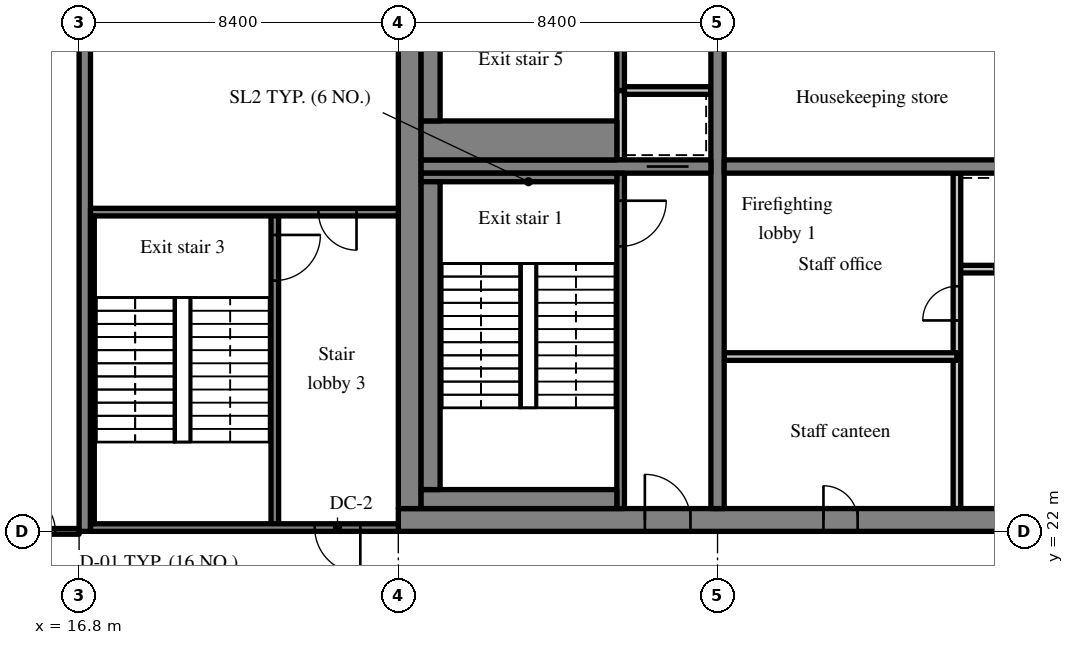
"""IFC4 building model, lengths in metres.
Left out: names, types, materials, properties, quantities, classifications, styles, units other than length and angle.
Written with IfcOpenShell. Run it as: python <this file> out.ifc"""

import sys

from ifc_helpers import new_model, si_unit, direction, frame, frame_2d, origin, place, context, subcontext, project, spatial, rectangle, extrude, source, transform, mapped, element, fill, save


model = new_model("IFC4")
c1 = context("Model", 3, precision=1e-05, world=origin(), true_north=direction((0.0, 1.0)))
c2 = subcontext(c1, "Body", "Model", "MODEL_VIEW")
j1 = project(units=[si_unit("LENGTHUNIT", "METRE"), si_unit("PLANEANGLEUNIT", "RADIAN")], contexts=[c1])
p1 = place(None, origin())
s1 = spatial("IfcSite", under=j1, at=p1, CompositionType="ELEMENT")
p2 = place(p1, origin())
s2 = spatial("IfcBuilding", under=s1, at=p2, CompositionType="ELEMENT")
p3 = place(p2, frame((0.0, 0.0, 225.7)))
s3 = spatial("IfcBuildingStorey", under=s2, at=p3, CompositionType="ELEMENT", Elevation=225.7)
m1 = source(origin(), c2, "Body", "SweptSolid", [
    extrude(rectangle(XDim=50.4, YDim=0.6, at=frame_2d((25.2, 0.0))), origin(), (0.0, 0.0, 1.0), 3.62),
])
p4 = place(p3, frame((25.2, 22.3, 0.0), z_axis=(0.0, 0.0, 1.0), x_axis=(1.0, 0.0, 0.0)))
e1 = element("IfcWall", 1, at=p4, inside=s3, PredefinedType="SHEAR", context=c2, shape_type="MappedRepresentation", body=[
    mapped(m1, transform((0.0, 0.0, 0.0), scale=1.0)),
])
m2 = source(origin(), c2, "Body", "SweptSolid", [
    extrude(rectangle(XDim=1.8, YDim=2.1, at=frame_2d((0.9, 1.05))), frame((0.0, 0.31, 0.0), z_axis=(0.0, -1.0, 0.0), x_axis=(1.0, 0.0, 0.0)), (0.0, 0.0, 1.0), 0.62),
])
p5 = place(p4, frame((15.9, 0.0, 0.0)))
e2 = element("IfcOpeningElement", 2, at=p5, cuts=e1, PredefinedType="OPENING", context=c2, shape_type="MappedRepresentation", body=[
    mapped(m2, transform((0.0, 0.0, 0.0), scale=1.0)),
])
m3 = source(origin(), c2, "Body", "SweptSolid", [
    extrude(rectangle(XDim=0.9, YDim=2.1, at=frame_2d((0.45, 1.05))), frame((0.0, 0.31, 0.0), z_axis=(0.0, -1.0, 0.0), x_axis=(1.0, 0.0, 0.0)), (0.0, 0.0, 1.0), 0.62),
])
p6 = place(p4, frame((11.187, 0.0, 0.0)))
e3 = element("IfcOpeningElement", 3, at=p6, cuts=e1, PredefinedType="OPENING", context=c2, shape_type="MappedRepresentation", body=[
    mapped(m3, transform((0.0, 0.0, 0.0), scale=1.0)),
])
p7 = place(p4, frame((21.513, 0.0, 0.0)))
e4 = element("IfcOpeningElement", 4, at=p7, cuts=e1, PredefinedType="OPENING", context=c2, shape_type="MappedRepresentation", body=[
    mapped(m3, transform((0.0, 0.0, 0.0), scale=1.0)),
])
p8 = place(p4, frame((32.7, 0.0, 0.0)))
e5 = element("IfcOpeningElement", 5, at=p8, cuts=e1, PredefinedType="OPENING", context=c2, shape_type="MappedRepresentation", body=[
    mapped(m2, transform((0.0, 0.0, 0.0), scale=1.0)),
])
m4 = source(origin(), c2, "Body", "SweptSolid", [
    extrude(rectangle(XDim=1.2, YDim=2.1, at=frame_2d((0.6, 1.05))), frame((0.0, 0.31, 0.0), z_axis=(0.0, -1.0, 0.0), x_axis=(1.0, 0.0, 0.0)), (0.0, 0.0, 1.0), 0.62),
])
p9 = place(p4, frame((6.488, 0.0, 0.0)))
e6 = element("IfcOpeningElement", 6, at=p9, cuts=e1, PredefinedType="OPENING", context=c2, shape_type="MappedRepresentation", body=[
    mapped(m4, transform((0.0, 0.0, 0.0), scale=1.0)),
])
p10 = place(p4, frame((47.925, 0.0, 0.0)))
e7 = element("IfcOpeningElement", 7, at=p10, cuts=e1, PredefinedType="OPENING", context=c2, shape_type="MappedRepresentation", body=[
    mapped(m4, transform((0.0, 0.0, 0.0), scale=1.0)),
])
m5 = source(origin(), c2, "Body", "SweptSolid", [
    extrude(rectangle(XDim=18.8, YDim=0.6, at=frame_2d((9.4, 0.0))), origin(), (0.0, 0.0, 1.0), 3.62),
])
p11 = place(p3, frame((25.5, 22.6, 0.0), z_axis=(0.0, 0.0, 1.0), x_axis=(0.0, 1.0, 0.0)))
e8 = element("IfcWall", 8, at=p11, inside=s3, PredefinedType="SHEAR", context=c2, shape_type="MappedRepresentation", body=[
    mapped(m5, transform((0.0, 0.0, 0.0), scale=1.0)),
])
m6 = source(origin(), c2, "Body", "SweptSolid", [
    extrude(rectangle(XDim=18.8, YDim=0.35, at=frame_2d((9.4, 0.0))), origin(), (0.0, 0.0, 1.0), 3.62),
])
p12 = place(p3, frame((33.6, 22.6, 0.0), z_axis=(0.0, 0.0, 1.0), x_axis=(0.0, 1.0, 0.0)))
e9 = element("IfcWall", 9, at=p12, inside=s3, PredefinedType="SHEAR", context=c2, shape_type="MappedRepresentation", body=[
    mapped(m6, transform((0.0, 0.0, 0.0), scale=1.0)),
])
m7 = source(origin(), c2, "Body", "SweptSolid", [
    extrude(rectangle(XDim=1.1, YDim=2.1, at=frame_2d((0.55, 1.05))), frame((0.0, 0.185, 0.0), z_axis=(0.0, -1.0, 0.0), x_axis=(1.0, 0.0, 0.0)), (0.0, 0.0, 1.0), 0.37),
])
p13 = place(p12, frame((12.85, 0.0, 0.0)))
e10 = element("IfcOpeningElement", 10, at=p13, cuts=e9, PredefinedType="OPENING", context=c2, shape_type="MappedRepresentation", body=[
    mapped(m7, transform((0.0, 0.0, 0.0), scale=1.0)),
])
m8 = source(origin(), c2, "Body", "SweptSolid", [
    extrude(rectangle(XDim=7.625, YDim=0.35, at=frame_2d((3.812, 0.0))), origin(), (0.0, 0.0, 1.0), 3.62),
])
p14 = place(p3, frame((25.8, 31.6, 0.0), z_axis=(0.0, 0.0, 1.0), x_axis=(1.0, 0.0, 0.0)))
e11 = element("IfcWall", 11, at=p14, inside=s3, PredefinedType="SHEAR", context=c2, shape_type="MappedRepresentation", body=[
    mapped(m8, transform((0.0, 0.0, 0.0), scale=1.0)),
])
p15 = place(p14, frame((5.938, 0.0, 0.0)))
e12 = element("IfcOpeningElement", 12, at=p15, cuts=e11, PredefinedType="OPENING", context=c2, shape_type="MappedRepresentation", body=[
    mapped(m7, transform((0.0, 0.0, 0.0), scale=1.0)),
])
m9 = source(origin(), c2, "Body", "SweptSolid", [
    extrude(rectangle(XDim=16.45, YDim=0.35, at=frame_2d((8.225, 0.0))), origin(), (0.0, 0.0, 1.0), 3.62),
])
p16 = place(p3, frame((33.775, 31.6, 0.0), z_axis=(0.0, 0.0, 1.0), x_axis=(1.0, 0.0, 0.0)))
e13 = element("IfcWall", 13, at=p16, inside=s3, PredefinedType="SHEAR", context=c2, shape_type="MappedRepresentation", body=[
    mapped(m9, transform((0.0, 0.0, 0.0), scale=1.0)),
])
m10 = source(origin(), c2, "Body", "SweptSolid", [
    extrude(rectangle(XDim=1.0, YDim=2.1, at=frame_2d((0.5, 1.05))), frame((0.0, 0.185, 0.0), z_axis=(0.0, -1.0, 0.0), x_axis=(1.0, 0.0, 0.0)), (0.0, 0.0, 1.0), 0.37),
])
p17 = place(p16, frame((14.837, 0.0, 0.0)))
e14 = element("IfcOpeningElement", 14, at=p17, cuts=e13, PredefinedType="OPENING", context=c2, shape_type="MappedRepresentation", body=[
    mapped(m10, transform((0.0, 0.0, 0.0), scale=1.0)),
])
m11 = source(origin(), c2, "Body", "SweptSolid", [
    extrude(rectangle(XDim=18.4, YDim=0.3, at=frame_2d((9.2, 0.0))), origin(), (0.0, 0.0, 1.0), 3.62),
])
p18 = place(p3, frame((16.95, 22.0, 0.0), z_axis=(0.0, 0.0, 1.0), x_axis=(0.0, 1.0, 0.0)))
e15 = element("IfcWall", 15, at=p18, inside=s3, PredefinedType="SHEAR", context=c2, shape_type="MappedRepresentation", body=[
    mapped(m11, transform((0.0, 0.0, 0.0), scale=1.0)),
])
m12 = source(origin(), c2, "Body", "SweptSolid", [
    extrude(rectangle(XDim=6.0, YDim=0.2, at=frame_2d((3.0, 0.0))), origin(), (0.0, 0.0, 1.0), 3.62),
])
p19 = place(p3, frame((39.9, 28.9, 0.0), z_axis=(0.0, 0.0, 1.0), x_axis=(1.0, 0.0, 0.0)))
e16 = element("IfcWall", 16, at=p19, inside=s3, PredefinedType="SOLIDWALL", context=c2, shape_type="MappedRepresentation", body=[
    mapped(m12, transform((0.0, 0.0, 0.0), scale=1.0)),
])
m13 = source(origin(), c2, "Body", "SweptSolid", [
    extrude(rectangle(XDim=1.1, YDim=2.1, at=frame_2d((0.55, 1.05))), frame((0.0, 0.11, 0.0), z_axis=(0.0, -1.0, 0.0), x_axis=(1.0, 0.0, 0.0)), (0.0, 0.0, 1.0), 0.22),
])
p20 = place(p19, frame((0.95, 0.0, 0.0)))
e17 = element("IfcOpeningElement", 17, at=p20, cuts=e16, PredefinedType="OPENING", context=c2, shape_type="MappedRepresentation", body=[
    mapped(m13, transform((0.0, 0.0, 0.0), scale=1.0)),
])
p21 = place(p19, frame((3.95, 0.0, 0.0)))
e18 = element("IfcOpeningElement", 18, at=p21, cuts=e16, PredefinedType="OPENING", context=c2, shape_type="MappedRepresentation", body=[
    mapped(m13, transform((0.0, 0.0, 0.0), scale=1.0)),
])
m14 = source(origin(), c2, "Body", "SweptSolid", [
    extrude(rectangle(XDim=8.825, YDim=0.2, at=frame_2d((4.413, 0.0))), origin(), (0.0, 0.0, 1.0), 3.62),
])
p22 = place(p3, frame((39.9, 22.6, 0.0), z_axis=(0.0, 0.0, 1.0), x_axis=(0.0, 1.0, 0.0)))
e19 = element("IfcWall", 19, at=p22, inside=s3, PredefinedType="PARTITIONING", context=c2, shape_type="MappedRepresentation", body=[
    mapped(m14, transform((0.0, 0.0, 0.0), scale=1.0)),
])
m15 = source(origin(), c2, "Body", "SweptSolid", [
    extrude(rectangle(XDim=0.9, YDim=2.1, at=frame_2d((0.45, 1.05))), frame((0.0, 0.11, 0.0), z_axis=(0.0, -1.0, 0.0), x_axis=(1.0, 0.0, 0.0)), (0.0, 0.0, 1.0), 0.22),
])
p23 = place(p22, frame((4.95, 0.0, 0.0)))
e20 = element("IfcOpeningElement", 20, at=p23, cuts=e19, PredefinedType="OPENING", context=c2, shape_type="MappedRepresentation", body=[
    mapped(m15, transform((0.0, 0.0, 0.0), scale=1.0)),
])
m16 = source(origin(), c2, "Body", "SweptSolid", [
    extrude(rectangle(XDim=6.125, YDim=0.2, at=frame_2d((3.062, 0.0))), origin(), (0.0, 0.0, 1.0), 3.62),
])
p24 = place(p3, frame((33.775, 26.6, 0.0), z_axis=(0.0, 0.0, 1.0), x_axis=(1.0, 0.0, 0.0)))
e21 = element("IfcWall", 21, at=p24, inside=s3, PredefinedType="PARTITIONING", context=c2, shape_type="MappedRepresentation", body=[
    mapped(m16, transform((0.0, 0.0, 0.0), scale=1.0)),
])
m17 = source(origin(), c2, "Body", "SweptSolid", [
    extrude(rectangle(XDim=8.825, YDim=0.2, at=frame_2d((4.413, 0.0))), origin(), (0.0, 0.0, 1.0), 3.62),
])
p25 = place(p3, frame((31.05, 22.6, 0.0), z_axis=(0.0, 0.0, 1.0), x_axis=(0.0, 1.0, 0.0)))
e22 = element("IfcWall", 22, at=p25, inside=s3, PredefinedType="SOLIDWALL", context=c2, shape_type="MappedRepresentation", body=[
    mapped(m17, transform((0.0, 0.0, 0.0), scale=1.0)),
])
m18 = source(origin(), c2, "Body", "SweptSolid", [
    extrude(rectangle(XDim=1.2, YDim=2.1, at=frame_2d((0.6, 1.05))), frame((0.0, 0.11, 0.0), z_axis=(0.0, -1.0, 0.0), x_axis=(1.0, 0.0, 0.0)), (0.0, 0.0, 1.0), 0.22),
])
p26 = place(p25, frame((6.9, 0.0, 0.0)))
e23 = element("IfcOpeningElement", 23, at=p26, cuts=e22, PredefinedType="OPENING", context=c2, shape_type="MappedRepresentation", body=[
    mapped(m18, transform((0.0, 0.0, 0.0), scale=1.0)),
])
m19 = source(origin(), c2, "Body", "SweptSolid", [
    extrude(rectangle(XDim=1.825, YDim=0.2, at=frame_2d((0.913, 0.0))), origin(), (0.0, 0.0, 1.0), 3.62),
])
p27 = place(p3, frame((31.05, 31.775, 0.0), z_axis=(0.0, 0.0, 1.0), x_axis=(0.0, 1.0, 0.0)))
e24 = element("IfcWall", 24, at=p27, inside=s3, PredefinedType="SOLIDWALL", context=c2, shape_type="MappedRepresentation", body=[
    mapped(m19, transform((0.0, 0.0, 0.0), scale=1.0)),
])
m20 = source(origin(), c2, "Body", "SweptSolid", [
    extrude(rectangle(XDim=2.275, YDim=0.2, at=frame_2d((1.138, 0.0))), origin(), (0.0, 0.0, 1.0), 3.62),
])
p28 = place(p3, frame((31.15, 33.6, 0.0), z_axis=(0.0, 0.0, 1.0), x_axis=(1.0, 0.0, 0.0)))
e25 = element("IfcWall", 25, at=p28, inside=s3, PredefinedType="SOLIDWALL", context=c2, shape_type="MappedRepresentation", body=[
    mapped(m20, transform((0.0, 0.0, 0.0), scale=1.0)),
])
m21 = source(origin(), c2, "Body", "SweptSolid", [
    extrude(rectangle(XDim=7.8, YDim=0.2, at=frame_2d((3.9, 0.0))), origin(), (0.0, 0.0, 1.0), 3.62),
])
p29 = place(p3, frame((31.05, 33.6, 0.0), z_axis=(0.0, 0.0, 1.0), x_axis=(0.0, 1.0, 0.0)))
e26 = element("IfcWall", 26, at=p29, inside=s3, PredefinedType="SOLIDWALL", context=c2, shape_type="MappedRepresentation", body=[
    mapped(m21, transform((0.0, 0.0, 0.0), scale=1.0)),
])
m22 = source(origin(), c2, "Body", "SweptSolid", [
    extrude(rectangle(XDim=1.8, YDim=2.1, at=frame_2d((0.9, 1.05))), frame((0.0, 0.11, 0.0), z_axis=(0.0, -1.0, 0.0), x_axis=(1.0, 0.0, 0.0)), (0.0, 0.0, 1.0), 0.22),
])
p30 = place(p29, frame((5.3, 0.0, 0.0)))
e27 = element("IfcOpeningElement", 27, at=p30, cuts=e26, PredefinedType="OPENING", context=c2, shape_type="MappedRepresentation", body=[
    mapped(m22, transform((0.0, 0.0, 0.0), scale=1.0)),
])
m23 = source(origin(), c2, "Body", "SweptSolid", [
    extrude(rectangle(XDim=8.3, YDim=0.2, at=frame_2d((4.15, 0.0))), origin(), (0.0, 0.0, 1.0), 3.62),
])
p31 = place(p3, frame((21.95, 22.1, 0.0), z_axis=(0.0, 0.0, 1.0), x_axis=(0.0, 1.0, 0.0)))
e28 = element("IfcWall", 28, at=p31, inside=s3, PredefinedType="SOLIDWALL", context=c2, shape_type="MappedRepresentation", body=[
    mapped(m23, transform((0.0, 0.0, 0.0), scale=1.0)),
])
p32 = place(p31, frame((6.5, 0.0, 0.0)))
e29 = element("IfcOpeningElement", 29, at=p32, cuts=e28, PredefinedType="OPENING", context=c2, shape_type="MappedRepresentation", body=[
    mapped(m18, transform((0.0, 0.0, 0.0), scale=1.0)),
])
m24 = source(origin(), c2, "Body", "SweptSolid", [
    extrude(rectangle(XDim=8.1, YDim=0.2, at=frame_2d((4.05, 0.0))), origin(), (0.0, 0.0, 1.0), 3.62),
])
p33 = place(p3, frame((17.1, 22.1, 0.0), z_axis=(0.0, 0.0, 1.0), x_axis=(1.0, 0.0, 0.0)))
e30 = element("IfcWall", 30, at=p33, inside=s3, PredefinedType="SOLIDWALL", context=c2, shape_type="MappedRepresentation", body=[
    mapped(m24, transform((0.0, 0.0, 0.0), scale=1.0)),
])
p34 = place(p33, frame((5.9, 0.0, 0.0)))
e31 = element("IfcOpeningElement", 31, at=p34, cuts=e30, PredefinedType="OPENING", context=c2, shape_type="MappedRepresentation", body=[
    mapped(m18, transform((0.0, 0.0, 0.0), scale=1.0)),
])
p35 = place(p3, frame((17.1, 30.4, 0.0), z_axis=(0.0, 0.0, 1.0), x_axis=(1.0, 0.0, 0.0)))
e32 = element("IfcWall", 32, at=p35, inside=s3, PredefinedType="SOLIDWALL", context=c2, shape_type="MappedRepresentation", body=[
    mapped(m24, transform((0.0, 0.0, 0.0), scale=1.0)),
])
m25 = source(origin(), c2, "Body", "SweptSolid", [
    extrude(rectangle(XDim=1.0, YDim=2.1, at=frame_2d((0.5, 1.05))), frame((0.0, 0.11, 0.0), z_axis=(0.0, -1.0, 0.0), x_axis=(1.0, 0.0, 0.0)), (0.0, 0.0, 1.0), 0.22),
])
p36 = place(p35, frame((6.0, 0.0, 0.0)))
e33 = element("IfcOpeningElement", 33, at=p36, cuts=e32, PredefinedType="OPENING", context=c2, shape_type="MappedRepresentation", body=[
    mapped(m25, transform((0.0, 0.0, 0.0), scale=1.0)),
])
m26 = source(origin(), c2, "Body", "SweptSolid", [
    extrude(rectangle(XDim=5.15, YDim=0.5, at=frame_2d((2.575, 0.0))), origin(), (0.0, 0.0, 1.0), 3.62),
])
p37 = place(p3, frame((25.8, 22.85, 0.0), z_axis=(0.0, 0.0, 1.0), x_axis=(1.0, 0.0, 0.0)))
e34 = element("IfcWall", 34, at=p37, inside=s3, PredefinedType="SOLIDWALL", context=c2, shape_type="MappedRepresentation", body=[
    mapped(m26, transform((0.0, 0.0, 0.0), scale=1.0)),
])
m27 = source(origin(), c2, "Body", "SweptSolid", [
    extrude(rectangle(XDim=5.15, YDim=0.225, at=frame_2d((2.575, 0.0))), origin(), (0.0, 0.0, 1.0), 3.62),
])
p38 = place(p3, frame((25.8, 31.312, 0.0), z_axis=(0.0, 0.0, 1.0), x_axis=(1.0, 0.0, 0.0)))
e35 = element("IfcWall", 35, at=p38, inside=s3, PredefinedType="SOLIDWALL", context=c2, shape_type="MappedRepresentation", body=[
    mapped(m27, transform((0.0, 0.0, 0.0), scale=1.0)),
])
m28 = source(origin(), c2, "Body", "SweptSolid", [
    extrude(rectangle(XDim=8.1, YDim=0.5, at=frame_2d((4.05, 0.0))), origin(), (0.0, 0.0, 1.0), 3.62),
])
p39 = place(p3, frame((26.05, 23.1, 0.0), z_axis=(0.0, 0.0, 1.0), x_axis=(0.0, 1.0, 0.0)))
e36 = element("IfcWall", 36, at=p39, inside=s3, PredefinedType="SOLIDWALL", context=c2, shape_type="MappedRepresentation", body=[
    mapped(m28, transform((0.0, 0.0, 0.0), scale=1.0)),
])
m29 = source(origin(), c2, "Body", "SweptSolid", [
    extrude(rectangle(XDim=8.1, YDim=0.1, at=frame_2d((4.05, 0.0))), origin(), (0.0, 0.0, 1.0), 3.62),
])
p40 = place(p3, frame((17.15, 22.2, 0.0), z_axis=(0.0, 0.0, 1.0), x_axis=(0.0, 1.0, 0.0)))
e37 = element("IfcWall", 37, at=p40, inside=s3, PredefinedType="SOLIDWALL", context=c2, shape_type="MappedRepresentation", body=[
    mapped(m29, transform((0.0, 0.0, 0.0), scale=1.0)),
])
m30 = source(origin(), c2, "Body", "SweptSolid", [
    extrude(rectangle(XDim=5.15, YDim=1.025, at=frame_2d((2.575, 0.0))), origin(), (0.0, 0.0, 1.0), 3.62),
])
p41 = place(p3, frame((25.8, 32.287, 0.0), z_axis=(0.0, 0.0, 1.0), x_axis=(1.0, 0.0, 0.0)))
e38 = element("IfcWall", 38, at=p41, inside=s3, PredefinedType="SOLIDWALL", context=c2, shape_type="MappedRepresentation", body=[
    mapped(m30, transform((0.0, 0.0, 0.0), scale=1.0)),
])
p42 = place(p3, frame((26.05, 32.8, 0.0), z_axis=(0.0, 0.0, 1.0), x_axis=(0.0, 1.0, 0.0)))
e39 = element("IfcWall", 39, at=p42, inside=s3, PredefinedType="SOLIDWALL", context=c2, shape_type="MappedRepresentation", body=[
    mapped(m28, transform((0.0, 0.0, 0.0), scale=1.0)),
])
m31 = source(origin(), c2, "Body", "SweptSolid", [
    extrude(rectangle(XDim=1.9, YDim=0.15, at=frame_2d((0.95, 0.0))), origin(), (0.0, 0.0, 1.0), 2.92),
])
p43 = place(p3, frame((14.9, 22.0, 0.0), z_axis=(0.0, 0.0, 1.0), x_axis=(1.0, 0.0, 0.0)))
e40 = element("IfcWall", 40, at=p43, inside=s3, PredefinedType="PARTITIONING", context=c2, shape_type="MappedRepresentation", body=[
    mapped(m31, transform((0.0, 0.0, 0.0), scale=1.0)),
])
m32 = source(origin(), c2, "Body", "SweptSolid", [
    extrude(rectangle(XDim=1.0, YDim=2.1, at=frame_2d((0.5, 1.05))), frame((0.0, 0.085, 0.0), z_axis=(0.0, -1.0, 0.0), x_axis=(1.0, 0.0, 0.0)), (0.0, 0.0, 1.0), 0.17),
])
p44 = place(p43, frame((0.275, 0.0, 0.0)))
e41 = element("IfcOpeningElement", 41, at=p44, cuts=e40, PredefinedType="OPENING", context=c2, shape_type="MappedRepresentation", body=[
    mapped(m32, transform((0.0, 0.0, 0.0), scale=1.0)),
])
m33 = source(origin(), c2, "Body", "SweptSolid", [
    extrude(rectangle(XDim=1.1, YDim=2.1, at=frame_2d((0.55, 1.05))), frame((0.0, 0.025, 0.0), z_axis=(0.0, -1.0, 0.0), x_axis=(1.0, 0.0, 0.0)), (0.0, 0.0, 1.0), 0.05),
])
p45 = place(p20, origin())
e42 = element("IfcDoor", 42, at=p45, inside=s3, OperationType="SLIDING_TO_LEFT", PredefinedType="DOOR", context=c2, shape_type="MappedRepresentation", body=[
    mapped(m33, transform((0.0, 0.0, 0.0), scale=1.0)),
])
fill(e17, e42)
m34 = source(origin(), c2, "Body", "SweptSolid", [
    extrude(rectangle(XDim=0.9, YDim=2.1, at=frame_2d((0.45, 1.05))), frame((0.0, 0.225, 0.0), z_axis=(0.0, -1.0, 0.0), x_axis=(1.0, 0.0, 0.0)), (0.0, 0.0, 1.0), 0.05),
])
p46 = place(p6, origin())
e43 = element("IfcDoor", 43, at=p46, inside=s3, OperationType="SINGLE_SWING_LEFT", PredefinedType="DOOR", context=c2, shape_type="MappedRepresentation", body=[
    mapped(m34, transform((0.0, 0.0, 0.0), scale=1.0)),
])
fill(e3, e43)
m35 = source(origin(), c2, "Body", "SweptSolid", [
    extrude(rectangle(XDim=0.9, YDim=2.1, at=frame_2d((0.45, 1.05))), frame((0.0, 0.025, 0.0), z_axis=(0.0, -1.0, 0.0), x_axis=(1.0, 0.0, 0.0)), (0.0, 0.0, 1.0), 0.05),
])
p47 = place(p23, origin())
e44 = element("IfcDoor", 44, at=p47, inside=s3, OperationType="SINGLE_SWING_LEFT", PredefinedType="DOOR", context=c2, shape_type="MappedRepresentation", body=[
    mapped(m35, transform((0.0, 0.0, 0.0), scale=1.0)),
])
fill(e20, e44)
m36 = source(origin(), c2, "Body", "SweptSolid", [
    extrude(rectangle(XDim=1.2, YDim=2.1, at=frame_2d((0.6, 1.05))), frame((0.0, 0.025, 0.0), z_axis=(0.0, -1.0, 0.0), x_axis=(1.0, 0.0, 0.0)), (0.0, 0.0, 1.0), 0.05),
])
p48 = place(p26, origin())
e45 = element("IfcDoor", 45, at=p48, inside=s3, OperationType="SINGLE_SWING_RIGHT", PredefinedType="DOOR", context=c2, shape_type="MappedRepresentation", body=[
    mapped(m36, transform((0.0, 0.0, 0.0), scale=1.0)),
])
fill(e23, e45)
m37 = source(origin(), c2, "Body", "SweptSolid", [
    extrude(rectangle(XDim=1.2, YDim=2.1, at=frame_2d((0.6, 1.05))), frame((0.0, 0.225, 0.0), z_axis=(0.0, -1.0, 0.0), x_axis=(1.0, 0.0, 0.0)), (0.0, 0.0, 1.0), 0.05),
])
p49 = place(p9, origin())
e46 = element("IfcDoor", 46, at=p49, inside=s3, OperationType="SINGLE_SWING_LEFT", PredefinedType="DOOR", context=c2, shape_type="MappedRepresentation", body=[
    mapped(m37, transform((0.0, 0.0, 0.0), scale=1.0)),
])
fill(e6, e46)
p50 = place(p15, origin())
e47 = element("IfcDoor", 47, at=p50, inside=s3, OperationType="SLIDING_TO_LEFT", PredefinedType="DOOR", context=c2, shape_type="MappedRepresentation", body=[
    mapped(m33, transform((0.0, 0.0, 0.0), scale=1.0)),
])
fill(e12, e47)
p51 = place(p32, origin())
e48 = element("IfcDoor", 48, at=p51, inside=s3, OperationType="SINGLE_SWING_RIGHT", PredefinedType="DOOR", context=c2, shape_type="MappedRepresentation", body=[
    mapped(m36, transform((0.0, 0.0, 0.0), scale=1.0)),
])
fill(e29, e48)
p52 = place(p34, origin())
e49 = element("IfcDoor", 49, at=p52, inside=s3, OperationType="SINGLE_SWING_RIGHT", PredefinedType="DOOR", context=c2, shape_type="MappedRepresentation", body=[
    mapped(m36, transform((0.0, 0.0, 0.0), scale=1.0)),
])
fill(e31, e49)
m38 = source(origin(), c2, "Body", "SweptSolid", [
    extrude(rectangle(XDim=1.0, YDim=2.1, at=frame_2d((0.5, 1.05))), frame((0.0, 0.025, 0.0), z_axis=(0.0, -1.0, 0.0), x_axis=(1.0, 0.0, 0.0)), (0.0, 0.0, 1.0), 0.05),
])
p53 = place(p36, origin())
e50 = element("IfcDoor", 50, at=p53, inside=s3, OperationType="SINGLE_SWING_RIGHT", PredefinedType="DOOR", context=c2, shape_type="MappedRepresentation", body=[
    mapped(m38, transform((0.0, 0.0, 0.0), scale=1.0)),
])
fill(e33, e50)
p54 = place(p44, origin())
e51 = element("IfcDoor", 51, at=p54, inside=s3, OperationType="SINGLE_SWING_LEFT", PredefinedType="DOOR", context=c2, shape_type="MappedRepresentation", body=[
    mapped(m38, transform((0.0, 0.0, 0.0), scale=1.0)),
])
fill(e41, e51)
save(model, sys.argv[1])
